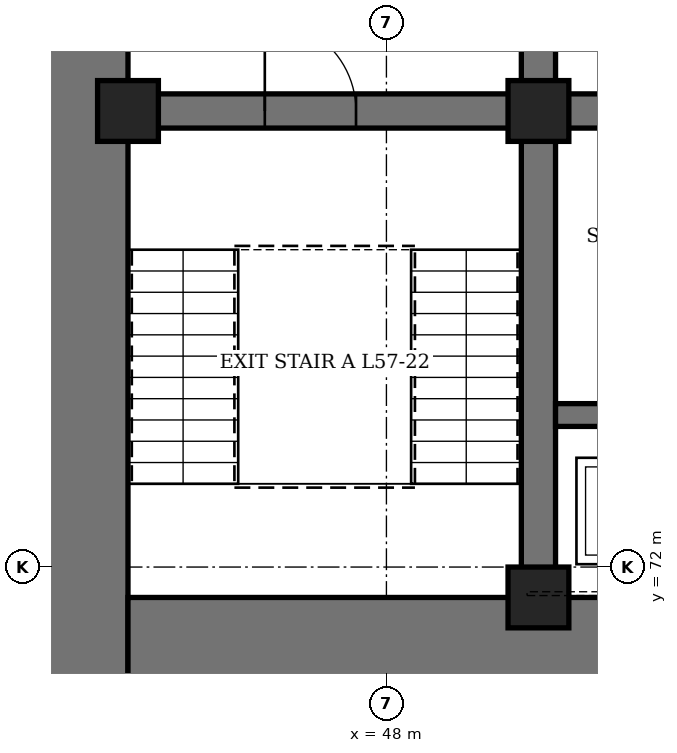
"""IFC4 building model, lengths in metres.
Left out: names, types, materials, properties, quantities, classifications, styles, units other than length and angle.
Written with IfcOpenShell. Run it as: python <this file> out.ifc"""

import sys

from ifc_helpers import new_model, si_unit, direction, frame, frame_2d, origin, origin_2d, place, context, subcontext, project, spatial, rectangle, hollow_rectangle, extrude, element, fill, save


model = new_model("IFC4")
c1 = context("Model", 3, precision=1e-05, world=origin(), true_north=direction((0.0, 1.0)))
c2 = subcontext(c1, "Body", "Model", "MODEL_VIEW")
j1 = project(units=[si_unit("LENGTHUNIT", "METRE"), si_unit("PLANEANGLEUNIT", "RADIAN")], contexts=[c1])
p1 = place(None, origin())
s1 = spatial("IfcSite", under=j1, at=p1, CompositionType="ELEMENT")
p2 = place(p1, origin())
s2 = spatial("IfcBuilding", under=s1, at=p2, CompositionType="ELEMENT")
p3 = place(p2, frame((0.0, 0.0, 254.5)))
s3 = spatial("IfcBuildingStorey", under=s2, at=p3, CompositionType="ELEMENT", Elevation=254.5)
p4 = place(p3, frame((44.0, 70.4, 0.0), z_axis=(0.0, 0.0, 1.0), x_axis=(0.0, 1.0, 0.0)))
e1 = element("IfcWall", 1, at=p4, inside=s3, PredefinedType="SHEAR", context=c2, shape_type="SweptSolid", body=[
    extrude(rectangle(XDim=19.2, YDim=1.2, at=frame_2d((9.6, 0.0))), origin(), (0.0, 0.0, 1.0), 4.2),
])
p5 = place(p4, frame((8.6, 0.0, 0.0)))
e2 = element("IfcOpeningElement", 2, at=p5, cuts=e1, PredefinedType="OPENING", context=c2, shape_type="SweptSolid", body=[
    extrude(rectangle(XDim=2.0, YDim=2.4, at=frame_2d((1.0, 1.2))), frame((0.0, 0.61, 0.0), z_axis=(0.0, -1.0, 0.0), x_axis=(1.0, 0.0, 0.0)), (0.0, 0.0, 1.0), 1.22),
])
p6 = place(p3, frame((44.6, 71.0, 0.0), z_axis=(0.0, 0.0, 1.0), x_axis=(1.0, 0.0, 0.0)))
e3 = element("IfcWall", 3, at=p6, inside=s3, PredefinedType="SHEAR", context=c2, shape_type="SweptSolid", body=[
    extrude(rectangle(XDim=22.8, YDim=1.2, at=frame_2d((11.4, 0.0))), origin(), (0.0, 0.0, 1.0), 4.2),
])
p7 = place(p6, frame((6.35, 0.0, 0.0)))
e4 = element("IfcOpeningElement", 4, at=p7, cuts=e3, PredefinedType="OPENING", context=c2, shape_type="SweptSolid", body=[
    extrude(rectangle(XDim=1.1, YDim=2.2, at=frame_2d((0.55, 1.1))), frame((0.0, 0.61, 0.0), z_axis=(0.0, -1.0, 0.0), x_axis=(1.0, 0.0, 0.0)), (0.0, 0.0, 1.0), 1.22),
])
p8 = place(p6, frame((9.35, 0.0, 0.0)))
e5 = element("IfcOpeningElement", 5, at=p8, cuts=e3, PredefinedType="OPENING", context=c2, shape_type="SweptSolid", body=[
    extrude(rectangle(XDim=1.1, YDim=2.2, at=frame_2d((0.55, 1.1))), frame((0.0, 0.61, 0.0), z_axis=(0.0, -1.0, 0.0), x_axis=(1.0, 0.0, 0.0)), (0.0, 0.0, 1.0), 1.22),
])
p9 = place(p6, frame((12.35, 0.0, 0.0)))
e6 = element("IfcOpeningElement", 6, at=p9, cuts=e3, PredefinedType="OPENING", context=c2, shape_type="SweptSolid", body=[
    extrude(rectangle(XDim=1.1, YDim=2.2, at=frame_2d((0.55, 1.1))), frame((0.0, 0.61, 0.0), z_axis=(0.0, -1.0, 0.0), x_axis=(1.0, 0.0, 0.0)), (0.0, 0.0, 1.0), 1.22),
])
p10 = place(p6, frame((15.35, 0.0, 0.0)))
e7 = element("IfcOpeningElement", 7, at=p10, cuts=e3, PredefinedType="OPENING", context=c2, shape_type="SweptSolid", body=[
    extrude(rectangle(XDim=1.1, YDim=2.2, at=frame_2d((0.55, 1.1))), frame((0.0, 0.61, 0.0), z_axis=(0.0, -1.0, 0.0), x_axis=(1.0, 0.0, 0.0)), (0.0, 0.0, 1.0), 1.22),
])
p11 = place(p3, frame((50.0, 71.6, 0.0), z_axis=(0.0, 0.0, 1.0), x_axis=(0.0, 1.0, 0.0)))
e8 = element("IfcWall", 8, at=p11, inside=s3, PredefinedType="SHEAR", context=c2, shape_type="SweptSolid", body=[
    extrude(rectangle(XDim=16.8, YDim=0.45, at=frame_2d((8.4, 0.0))), origin(), (0.0, 0.0, 1.0), 4.2),
])
p12 = place(p11, frame((7.5, 0.0, 0.0)))
e9 = element("IfcOpeningElement", 9, at=p12, cuts=e8, PredefinedType="OPENING", context=c2, shape_type="SweptSolid", body=[
    extrude(rectangle(XDim=1.8, YDim=2.4, at=frame_2d((0.9, 1.2))), frame((0.0, 0.235, 0.0), z_axis=(0.0, -1.0, 0.0), x_axis=(1.0, 0.0, 0.0)), (0.0, 0.0, 1.0), 0.47),
])
p13 = place(p3, frame((44.6, 78.0, 0.0), z_axis=(0.0, 0.0, 1.0), x_axis=(1.0, 0.0, 0.0)))
e10 = element("IfcWall", 10, at=p13, inside=s3, PredefinedType="SHEAR", context=c2, shape_type="SweptSolid", body=[
    extrude(rectangle(XDim=5.175, YDim=0.45, at=frame_2d((2.587, 0.0))), origin(), (0.0, 0.0, 1.0), 4.2),
])
p14 = place(p13, frame((1.8, 0.0, 0.0)))
e11 = element("IfcOpeningElement", 11, at=p14, cuts=e10, PredefinedType="OPENING", context=c2, shape_type="SweptSolid", body=[
    extrude(rectangle(XDim=1.2, YDim=2.1, at=frame_2d((0.6, 1.05))), frame((0.0, 0.235, 0.0), z_axis=(0.0, -1.0, 0.0), x_axis=(1.0, 0.0, 0.0)), (0.0, 0.0, 1.0), 0.47),
])
p15 = place(p3, frame((50.225, 78.0, 0.0), z_axis=(0.0, 0.0, 1.0), x_axis=(1.0, 0.0, 0.0)))
e12 = element("IfcWall", 12, at=p15, inside=s3, PredefinedType="SHEAR", context=c2, shape_type="SweptSolid", body=[
    extrude(rectangle(XDim=11.55, YDim=0.45, at=frame_2d((5.775, 0.0))), origin(), (0.0, 0.0, 1.0), 4.2),
])
p16 = place(p15, frame((0.825, 0.0, 0.0)))
e13 = element("IfcOpeningElement", 13, at=p16, cuts=e12, PredefinedType="OPENING", context=c2, shape_type="SweptSolid", body=[
    extrude(rectangle(XDim=0.9, YDim=2.1, at=frame_2d((0.45, 1.05))), frame((0.0, 0.235, 0.0), z_axis=(0.0, -1.0, 0.0), x_axis=(1.0, 0.0, 0.0)), (0.0, 0.0, 1.0), 0.47),
])
p17 = place(p15, frame((3.825, 0.0, 0.0)))
e14 = element("IfcOpeningElement", 14, at=p17, cuts=e12, PredefinedType="OPENING", context=c2, shape_type="SweptSolid", body=[
    extrude(rectangle(XDim=0.9, YDim=2.1, at=frame_2d((0.45, 1.05))), frame((0.0, 0.235, 0.0), z_axis=(0.0, -1.0, 0.0), x_axis=(1.0, 0.0, 0.0)), (0.0, 0.0, 1.0), 0.47),
])
p18 = place(p15, frame((6.825, 0.0, 0.0)))
e15 = element("IfcOpeningElement", 15, at=p18, cuts=e12, PredefinedType="OPENING", context=c2, shape_type="SweptSolid", body=[
    extrude(rectangle(XDim=0.9, YDim=2.1, at=frame_2d((0.45, 1.05))), frame((0.0, 0.235, 0.0), z_axis=(0.0, -1.0, 0.0), x_axis=(1.0, 0.0, 0.0)), (0.0, 0.0, 1.0), 0.47),
])
p19 = place(p15, frame((9.825, 0.0, 0.0)))
e16 = element("IfcOpeningElement", 16, at=p19, cuts=e12, PredefinedType="OPENING", context=c2, shape_type="SweptSolid", body=[
    extrude(rectangle(XDim=0.9, YDim=2.1, at=frame_2d((0.45, 1.05))), frame((0.0, 0.235, 0.0), z_axis=(0.0, -1.0, 0.0), x_axis=(1.0, 0.0, 0.0)), (0.0, 0.0, 1.0), 0.47),
])
p20 = place(p3, frame((50.225, 74.0, 0.0), z_axis=(0.0, 0.0, 1.0), x_axis=(1.0, 0.0, 0.0)))
e17 = element("IfcWall", 17, at=p20, inside=s3, PredefinedType="SHEAR", context=c2, shape_type="SweptSolid", body=[
    extrude(rectangle(XDim=11.55, YDim=0.3, at=frame_2d((5.775, 0.0))), origin(), (0.0, 0.0, 1.0), 4.2),
])
for number, where, z_axis, x_axis in (
    (18, (44.6, 78.0, 0.0), (0.0, 0.0, 1.0), (1.0, 0.0, 0.0)),
    (19, (50.0, 71.6, 0.0), (0.0, 0.0, 1.0), (1.0, 0.0, 0.0)),
    (20, (50.0, 78.0, 0.0), (0.0, 0.0, 1.0), (1.0, 0.0, 0.0)),
):
    element("IfcColumn", number, at=place(p3, frame(where, z_axis=z_axis, x_axis=x_axis)), inside=s3, PredefinedType="COLUMN", context=c2, shape_type="SweptSolid", body=[
        extrude(hollow_rectangle(XDim=0.8, YDim=0.8, WallThickness=0.1, at=origin_2d()), origin(), (0.0, 0.0, 1.0), 4.2),
    ])
p21 = place(p14, origin())
e21 = element("IfcDoor", 21, at=p21, inside=s3, OperationType="SINGLE_SWING_LEFT", PredefinedType="DOOR", context=c2, shape_type="SweptSolid", body=[
    extrude(rectangle(XDim=1.2, YDim=2.1, at=frame_2d((0.6, 1.05))), frame((0.0, 0.225, 0.0), z_axis=(0.0, -1.0, 0.0), x_axis=(1.0, 0.0, 0.0)), (0.0, 0.0, 1.0), 0.449),
])
fill(e11, e21)
save(model, sys.argv[1])
